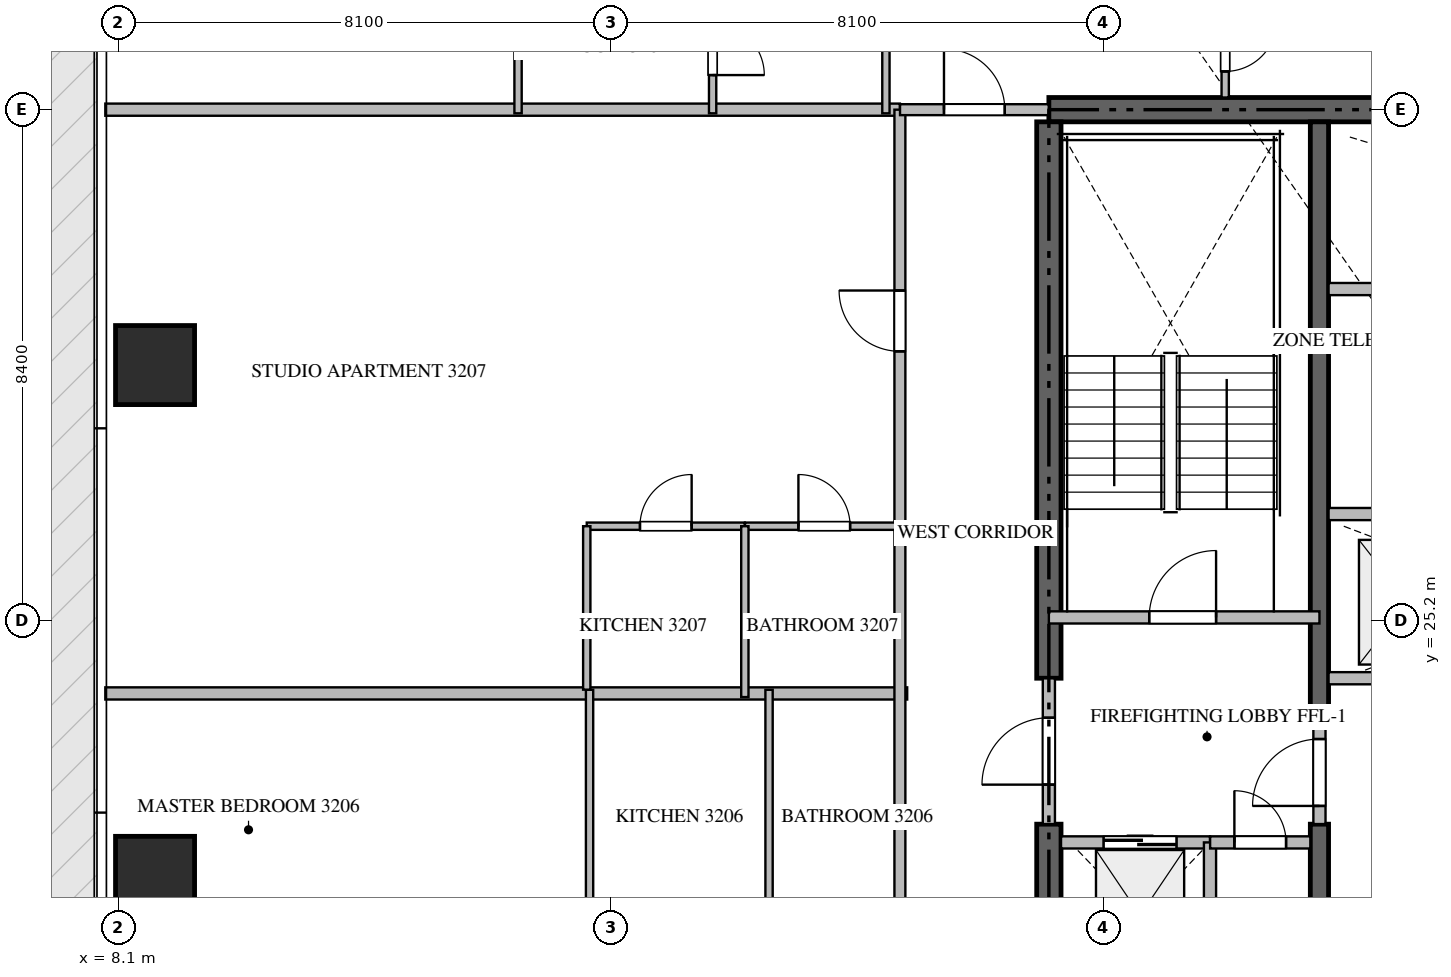
"""IFC4 building model, lengths in metres.
Left out: names, types, materials, properties, quantities, classifications, styles, units other than length and angle.
Written with IfcOpenShell. Run it as: python <this file> out.ifc"""

import sys

from ifc_helpers import new_model, si_unit, direction, frame, frame_2d, origin, origin_2d, place, context, subcontext, project, spatial, rectangle, extrude, source, transform, mapped, element, fill, save


model = new_model("IFC4")
c1 = context("Model", 3, precision=1e-05, world=origin(), true_north=direction((0.0, 1.0)))
c2 = subcontext(c1, "Body", "Model", "MODEL_VIEW")
j1 = project(units=[si_unit("LENGTHUNIT", "METRE"), si_unit("PLANEANGLEUNIT", "RADIAN")], contexts=[c1])
p1 = place(None, origin())
s1 = spatial("IfcSite", under=j1, at=p1, CompositionType="ELEMENT")
p2 = place(p1, origin())
s2 = spatial("IfcBuilding", under=s1, at=p2, CompositionType="ELEMENT")
p3 = place(p2, frame((0.0, 0.0, 131.4)))
s3 = spatial("IfcBuildingStorey", under=s2, at=p3, CompositionType="ELEMENT", Elevation=131.4)
p4 = place(p3, frame((41.4, 33.6, -0.26), z_axis=(0.0, 0.0, 1.0), x_axis=(-1.0, 0.0, 0.0)))
e1 = element("IfcWall", 1, at=p4, inside=s3, PredefinedType="SHEAR", context=c2, shape_type="SweptSolid", body=[
    extrude(rectangle(XDim=18.0, YDim=0.4, at=frame_2d((9.0, 0.0))), origin(), (0.0, 0.0, 1.0), 3.748),
])
p5 = place(p3, frame((23.4, 17.0, -0.26), z_axis=(0.0, 0.0, 1.0), x_axis=(0.0, 1.0, 0.0)))
e2 = element("IfcWall", 2, at=p5, inside=s3, PredefinedType="SHEAR", context=c2, shape_type="SweptSolid", body=[
    extrude(rectangle(XDim=4.85, YDim=0.4, at=frame_2d((2.425, 0.0))), origin(), (0.0, 0.0, 1.0), 3.748),
])
p6 = place(p3, frame((23.4, 24.25, -0.26), z_axis=(0.0, 0.0, 1.0), x_axis=(0.0, 1.0, 0.0)))
e3 = element("IfcWall", 3, at=p6, inside=s3, PredefinedType="SHEAR", context=c2, shape_type="SweptSolid", body=[
    extrude(rectangle(XDim=9.15, YDim=0.4, at=frame_2d((4.575, 0.0))), origin(), (0.0, 0.0, 1.0), 3.748),
])
p7 = place(p3, frame((27.85, 17.0, -0.26), z_axis=(0.0, 0.0, 1.0), x_axis=(0.0, 1.0, 0.0)))
e4 = element("IfcWall", 4, at=p7, inside=s3, PredefinedType="SHEAR", context=c2, shape_type="SweptSolid", body=[
    extrude(rectangle(XDim=4.85, YDim=0.3, at=frame_2d((2.425, 0.0))), origin(), (0.0, 0.0, 1.0), 3.748),
])
p8 = place(p3, frame((27.85, 23.55, -0.26), z_axis=(0.0, 0.0, 1.0), x_axis=(0.0, 1.0, 0.0)))
e5 = element("IfcWall", 5, at=p8, inside=s3, PredefinedType="SHEAR", context=c2, shape_type="SweptSolid", body=[
    extrude(rectangle(XDim=9.85, YDim=0.3, at=frame_2d((4.925, 0.0))), origin(), (0.0, 0.0, 1.0), 3.748),
])
m1 = source(origin(), c2, "Body", "SweptSolid", [
    extrude(rectangle(XDim=1.3, YDim=1.3, at=origin_2d()), origin(), (0.0, 0.0, 1.0), 3.75),
])
for number, where, z_axis, x_axis in (
    (6, (8.7, 21.0, -0.26), (0.0, 0.0, 1.0), (1.0, 0.0, 0.0)),
    (7, (8.7, 29.4, -0.26), (0.0, 0.0, 1.0), (1.0, 0.0, 0.0)),
):
    element("IfcColumn", number, at=place(p3, frame(where, z_axis=z_axis, x_axis=x_axis)), inside=s3, PredefinedType="COLUMN", context=c2, shape_type="MappedRepresentation", body=[
        mapped(m1, transform((0.0, 0.0, 0.0), scale=1.0)),
    ])
p9 = place(p3, frame((23.4, 25.25, 0.0), z_axis=(0.0, 0.0, 1.0), x_axis=(1.0, 0.0, 0.0)))
e8 = element("IfcWall", 8, at=p9, inside=s3, PredefinedType="STANDARD", context=c2, shape_type="SweptSolid", body=[
    extrude(rectangle(XDim=4.45, YDim=0.2, at=frame_2d((2.225, 0.0))), origin(), (0.0, 0.0, 1.0), 3.49),
])
p10 = place(p9, frame((1.65, 0.0, 0.0)))
e9 = element("IfcOpeningElement", 9, at=p10, cuts=e8, PredefinedType="OPENING", context=c2, shape_type="SweptSolid", body=[
    extrude(rectangle(XDim=1.1, YDim=2.15, at=frame_2d((0.55, 1.075))), frame((0.0, 0.11, 0.0), z_axis=(0.0, -1.0, 0.0), x_axis=(1.0, 0.0, 0.0)), (0.0, 0.0, 1.0), 0.22),
])
p11 = place(p3, frame((23.6, 21.55, 0.0), z_axis=(0.0, 0.0, 1.0), x_axis=(1.0, 0.0, 0.0)))
e10 = element("IfcWall", 10, at=p11, inside=s3, PredefinedType="STANDARD", context=c2, shape_type="SweptSolid", body=[
    extrude(rectangle(XDim=2.45, YDim=0.2, at=frame_2d((1.225, 0.0))), origin(), (0.0, 0.0, 1.0), 3.49),
])
p12 = place(p11, frame((0.7, 0.0, 0.0)))
e11 = element("IfcOpeningElement", 11, at=p12, cuts=e10, PredefinedType="OPENING", context=c2, shape_type="SweptSolid", body=[
    extrude(rectangle(XDim=1.2, YDim=2.2, at=frame_2d((0.6, 1.1))), frame((0.0, 0.11, 0.0), z_axis=(0.0, -1.0, 0.0), x_axis=(1.0, 0.0, 0.0)), (0.0, 0.0, 1.0), 0.22),
])
p13 = place(p3, frame((28.0, 24.25, 0.0), z_axis=(0.0, 0.0, 1.0), x_axis=(1.0, 0.0, 0.0)))
e12 = element("IfcWall", 12, at=p13, inside=s3, PredefinedType="STANDARD", context=c2, shape_type="SweptSolid", body=[
    extrude(rectangle(XDim=2.425, YDim=0.2, at=frame_2d((1.212, 0.0))), origin(), (0.0, 0.0, 1.0), 3.49),
])
p14 = place(p13, frame((0.75, 0.0, 0.0)))
e13 = element("IfcOpeningElement", 13, at=p14, cuts=e12, PredefinedType="OPENING", context=c2, shape_type="SweptSolid", body=[
    extrude(rectangle(XDim=1.1, YDim=2.2, at=frame_2d((0.55, 1.1))), frame((0.0, 0.11, 0.0), z_axis=(0.0, -1.0, 0.0), x_axis=(1.0, 0.0, 0.0)), (0.0, 0.0, 1.0), 0.22),
])
p15 = place(p3, frame((28.0, 30.65, 0.0), z_axis=(0.0, 0.0, 1.0), x_axis=(1.0, 0.0, 0.0)))
e14 = element("IfcWall", 14, at=p15, inside=s3, PredefinedType="STANDARD", context=c2, shape_type="SweptSolid", body=[
    extrude(rectangle(XDim=2.55, YDim=0.2, at=frame_2d((1.275, 0.0))), origin(), (0.0, 0.0, 1.0), 3.49),
])
p16 = place(p3, frame((26.05, 19.05, 0.0), z_axis=(0.0, 0.0, 1.0), x_axis=(0.0, 1.0, 0.0)))
e15 = element("IfcWall", 15, at=p16, inside=s3, PredefinedType="STANDARD", context=c2, shape_type="SweptSolid", body=[
    extrude(rectangle(XDim=2.5, YDim=0.2, at=frame_2d((1.25, 0.0))), origin(), (0.0, 0.0, 1.0), 3.49),
])
p17 = place(p3, frame((26.052, 21.55, 0.0), z_axis=(0.0, 0.0, 1.0), x_axis=(1.0, 0.0, 0.0)))
e16 = element("IfcWall", 16, at=p17, inside=s3, PredefinedType="STANDARD", context=c2, shape_type="SweptSolid", body=[
    extrude(rectangle(XDim=1.648, YDim=0.2, at=frame_2d((0.824, 0.0))), origin(), (0.0, 0.0, 1.0), 3.49),
])
p18 = place(p17, frame((0.399, 0.0, 0.0)))
e17 = element("IfcOpeningElement", 17, at=p18, cuts=e16, PredefinedType="OPENING", context=c2, shape_type="SweptSolid", body=[
    extrude(rectangle(XDim=0.85, YDim=2.1, at=frame_2d((0.425, 1.05))), frame((0.0, 0.11, 0.0), z_axis=(0.0, -1.0, 0.0), x_axis=(1.0, 0.0, 0.0)), (0.0, 0.0, 1.0), 0.22),
])
p19 = place(p3, frame((23.4, 21.852, 0.0), z_axis=(0.0, 0.0, 1.0), x_axis=(0.0, 1.0, 0.0)))
e18 = element("IfcWall", 18, at=p19, inside=s3, PredefinedType="STANDARD", context=c2, shape_type="SweptSolid", body=[
    extrude(rectangle(XDim=2.396, YDim=0.2, at=frame_2d((1.198, 0.0))), origin(), (0.0, 0.0, 1.0), 3.49),
])
p20 = place(p19, frame((0.648, 0.0, 0.0)))
e19 = element("IfcOpeningElement", 19, at=p20, cuts=e18, PredefinedType="OPENING", context=c2, shape_type="SweptSolid", body=[
    extrude(rectangle(XDim=1.1, YDim=2.15, at=frame_2d((0.55, 1.075))), frame((0.0, 0.11, 0.0), z_axis=(0.0, -1.0, 0.0), x_axis=(1.0, 0.0, 0.0)), (0.0, 0.0, 1.0), 0.22),
])
p21 = place(p3, frame((27.85, 21.852, 0.0), z_axis=(0.0, 0.0, 1.0), x_axis=(0.0, 1.0, 0.0)))
e20 = element("IfcWall", 20, at=p21, inside=s3, PredefinedType="STANDARD", context=c2, shape_type="SweptSolid", body=[
    extrude(rectangle(XDim=1.696, YDim=0.2, at=frame_2d((0.848, 0.0))), origin(), (0.0, 0.0, 1.0), 3.49),
])
p22 = place(p21, frame((0.298, 0.0, 0.0)))
e21 = element("IfcOpeningElement", 21, at=p22, cuts=e20, PredefinedType="OPENING", context=c2, shape_type="SweptSolid", body=[
    extrude(rectangle(XDim=1.1, YDim=2.15, at=frame_2d((0.55, 1.075))), frame((0.0, 0.11, 0.0), z_axis=(0.0, -1.0, 0.0), x_axis=(1.0, 0.0, 0.0)), (0.0, 0.0, 1.0), 0.22),
])
p23 = place(p3, frame((28.0, 26.95, 0.0), z_axis=(0.0, 0.0, 1.0), x_axis=(1.0, 0.0, 0.0)))
e22 = element("IfcWall", 22, at=p23, inside=s3, PredefinedType="STANDARD", context=c2, shape_type="SweptSolid", body=[
    extrude(rectangle(XDim=6.95, YDim=0.2, at=frame_2d((3.475, 0.0))), origin(), (0.0, 0.0, 1.0), 3.49),
])
p24 = place(p3, frame((7.882, 24.0, 0.0), z_axis=(0.0, 0.0, 1.0), x_axis=(1.0, 0.0, 0.0)))
e23 = element("IfcWall", 23, at=p24, inside=s3, PredefinedType="PARTITIONING", context=c2, shape_type="SweptSolid", body=[
    extrude(rectangle(XDim=13.188, YDim=0.2, at=frame_2d((6.594, 0.0))), origin(), (0.0, 0.0, 1.0), 3.49),
])
p25 = place(p3, frame((7.882, 33.6, 0.0), z_axis=(0.0, 0.0, 1.0), x_axis=(1.0, 0.0, 0.0)))
e24 = element("IfcWall", 24, at=p25, inside=s3, PredefinedType="PARTITIONING", context=c2, shape_type="SweptSolid", body=[
    extrude(rectangle(XDim=13.068, YDim=0.2, at=frame_2d((6.534, 0.0))), origin(), (0.0, 0.0, 1.0), 3.49),
])
p26 = place(p3, frame((20.95, 14.9, 0.0), z_axis=(0.0, 0.0, 1.0), x_axis=(0.0, 1.0, 0.0)))
e25 = element("IfcWall", 25, at=p26, inside=s3, PredefinedType="PARTITIONING", context=c2, shape_type="SweptSolid", body=[
    extrude(rectangle(XDim=18.7, YDim=0.18, at=frame_2d((9.35, 0.0))), origin(), (0.0, 0.0, 1.0), 3.49),
])
p27 = place(p26, frame((1.805, 0.0, 0.0)))
e26 = element("IfcOpeningElement", 26, at=p27, cuts=e25, PredefinedType="OPENING", context=c2, shape_type="SweptSolid", body=[
    extrude(rectangle(XDim=1.0, YDim=2.15, at=frame_2d((0.5, 1.075))), frame((0.0, 0.1, 0.0), z_axis=(0.0, -1.0, 0.0), x_axis=(1.0, 0.0, 0.0)), (0.0, 0.0, 1.0), 0.2),
])
p28 = place(p26, frame((14.726, 0.0, 0.0)))
e27 = element("IfcOpeningElement", 27, at=p28, cuts=e25, PredefinedType="OPENING", context=c2, shape_type="SweptSolid", body=[
    extrude(rectangle(XDim=1.0, YDim=2.15, at=frame_2d((0.5, 1.075))), frame((0.0, 0.1, 0.0), z_axis=(0.0, -1.0, 0.0), x_axis=(1.0, 0.0, 0.0)), (0.0, 0.0, 1.0), 0.2),
])
p29 = place(p3, frame((20.952, 33.6, 0.0), z_axis=(0.0, 0.0, 1.0), x_axis=(1.0, 0.0, 0.0)))
e28 = element("IfcWall", 28, at=p29, inside=s3, PredefinedType="PARTITIONING", context=c2, shape_type="SweptSolid", body=[
    extrude(rectangle(XDim=2.446, YDim=0.18, at=frame_2d((1.223, 0.0))), origin(), (0.0, 0.0, 1.0), 3.49),
])
p30 = place(p29, frame((0.723, 0.0, 0.0)))
e29 = element("IfcOpeningElement", 29, at=p30, cuts=e28, PredefinedType="OPENING", context=c2, shape_type="SweptSolid", body=[
    extrude(rectangle(XDim=1.0, YDim=2.15, at=frame_2d((0.5, 1.075))), frame((0.0, 0.1, 0.0), z_axis=(0.0, -1.0, 0.0), x_axis=(1.0, 0.0, 0.0)), (0.0, 0.0, 1.0), 0.2),
])
p31 = place(p3, frame((20.72, 36.35, 0.0), z_axis=(0.0, 0.0, 1.0), x_axis=(0.0, -1.0, 0.0)))
e30 = element("IfcWall", 30, at=p31, inside=s3, PredefinedType="PARTITIONING", context=c2, shape_type="SweptSolid", body=[
    extrude(rectangle(XDim=2.81, YDim=0.12, at=frame_2d((1.405, 0.0))), origin(), (0.0, 0.0, 1.0), 3.49),
])
p32 = place(p3, frame((14.67, 35.65, 0.0), z_axis=(0.0, 0.0, 1.0), x_axis=(0.0, -1.0, 0.0)))
e31 = element("IfcWall", 31, at=p32, inside=s3, PredefinedType="PARTITIONING", context=c2, shape_type="SweptSolid", body=[
    extrude(rectangle(XDim=2.11, YDim=0.12, at=frame_2d((1.055, 0.0))), origin(), (0.0, 0.0, 1.0), 3.49),
])
p33 = place(p3, frame((17.87, 35.648, 0.0), z_axis=(0.0, 0.0, 1.0), x_axis=(0.0, -1.0, 0.0)))
e32 = element("IfcWall", 32, at=p33, inside=s3, PredefinedType="PARTITIONING", context=c2, shape_type="SweptSolid", body=[
    extrude(rectangle(XDim=2.108, YDim=0.12, at=frame_2d((1.054, 0.0))), origin(), (0.0, 0.0, 1.0), 3.49),
])
p34 = place(p33, frame((0.629, 0.0, 0.0)))
e33 = element("IfcOpeningElement", 33, at=p34, cuts=e32, PredefinedType="OPENING", context=c2, shape_type="SweptSolid", body=[
    extrude(rectangle(XDim=0.85, YDim=2.1, at=frame_2d((0.425, 1.05))), frame((0.0, 0.07, 0.0), z_axis=(0.0, -1.0, 0.0), x_axis=(1.0, 0.0, 0.0)), (0.0, 0.0, 1.0), 0.14),
])
p35 = place(p3, frame((26.3, 35.648, 0.0), z_axis=(0.0, 0.0, 1.0), x_axis=(0.0, -1.0, 0.0)))
e34 = element("IfcWall", 34, at=p35, inside=s3, PredefinedType="PARTITIONING", context=c2, shape_type="SweptSolid", body=[
    extrude(rectangle(XDim=1.848, YDim=0.12, at=frame_2d((0.924, 0.0))), origin(), (0.0, 0.0, 1.0), 3.49),
])
p36 = place(p35, frame((0.569, 0.0, 0.0)))
e35 = element("IfcOpeningElement", 35, at=p36, cuts=e34, PredefinedType="OPENING", context=c2, shape_type="SweptSolid", body=[
    extrude(rectangle(XDim=0.85, YDim=2.1, at=frame_2d((0.425, 1.05))), frame((0.0, 0.07, 0.0), z_axis=(0.0, -1.0, 0.0), x_axis=(1.0, 0.0, 0.0)), (0.0, 0.0, 1.0), 0.14),
])
for number, where, z_axis, x_axis in (
    (36, (15.846, 19.4, 0.0), (0.0, 0.0, 1.0), (0.0, 1.0, 0.0)),
    (37, (18.798, 19.4, 0.0), (0.0, 0.0, 1.0), (0.0, 1.0, 0.0)),
):
    element("IfcWall", number, at=place(p3, frame(where, z_axis=z_axis, x_axis=x_axis)), inside=s3, PredefinedType="PARTITIONING", context=c2, shape_type="SweptSolid", body=[
        extrude(rectangle(XDim=4.66, YDim=0.12, at=frame_2d((2.33, 0.0))), origin(), (0.0, 0.0, 1.0), 3.49),
    ])
p37 = place(p3, frame((15.8, 26.75, 0.0), z_axis=(0.0, 0.0, 1.0), x_axis=(1.0, 0.0, 0.0)))
e38 = element("IfcWall", 38, at=p37, inside=s3, PredefinedType="PARTITIONING", context=c2, shape_type="SweptSolid", body=[
    extrude(rectangle(XDim=2.6, YDim=0.12, at=frame_2d((1.3, 0.0))), origin(), (0.0, 0.0, 1.0), 3.49),
])
p38 = place(p37, frame((0.875, 0.0, 0.0)))
e39 = element("IfcOpeningElement", 39, at=p38, cuts=e38, PredefinedType="OPENING", context=c2, shape_type="SweptSolid", body=[
    extrude(rectangle(XDim=0.85, YDim=2.1, at=frame_2d((0.425, 1.05))), frame((0.0, 0.07, 0.0), z_axis=(0.0, -1.0, 0.0), x_axis=(1.0, 0.0, 0.0)), (0.0, 0.0, 1.0), 0.14),
])
p39 = place(p3, frame((18.402, 26.75, 0.0), z_axis=(0.0, 0.0, 1.0), x_axis=(1.0, 0.0, 0.0)))
e40 = element("IfcWall", 40, at=p39, inside=s3, PredefinedType="PARTITIONING", context=c2, shape_type="SweptSolid", body=[
    extrude(rectangle(XDim=2.608, YDim=0.12, at=frame_2d((1.304, 0.0))), origin(), (0.0, 0.0, 1.0), 3.49),
])
p40 = place(p39, frame((0.879, 0.0, 0.0)))
e41 = element("IfcOpeningElement", 41, at=p40, cuts=e40, PredefinedType="OPENING", context=c2, shape_type="SweptSolid", body=[
    extrude(rectangle(XDim=0.85, YDim=2.1, at=frame_2d((0.425, 1.05))), frame((0.0, 0.07, 0.0), z_axis=(0.0, -1.0, 0.0), x_axis=(1.0, 0.0, 0.0)), (0.0, 0.0, 1.0), 0.14),
])
p41 = place(p3, frame((18.4, 23.94, 0.0), z_axis=(0.0, 0.0, 1.0), x_axis=(0.0, 1.0, 0.0)))
e42 = element("IfcWall", 42, at=p41, inside=s3, PredefinedType="PARTITIONING", context=c2, shape_type="SweptSolid", body=[
    extrude(rectangle(XDim=2.81, YDim=0.12, at=frame_2d((1.405, 0.0))), origin(), (0.0, 0.0, 1.0), 3.49),
])
p42 = place(p3, frame((15.8, 24.062, 0.0), z_axis=(0.0, 0.0, 1.0), x_axis=(0.0, 1.0, 0.0)))
e43 = element("IfcWall", 43, at=p42, inside=s3, PredefinedType="PARTITIONING", context=c2, shape_type="SweptSolid", body=[
    extrude(rectangle(XDim=2.688, YDim=0.12, at=frame_2d((1.344, 0.0))), origin(), (0.0, 0.0, 1.0), 3.49),
])
m2 = source(origin(), c2, "Body", "SweptSolid", [
    extrude(rectangle(XDim=1.1, YDim=2.15, at=frame_2d((0.55, 1.075))), frame((0.0, 0.025, 0.0), z_axis=(0.0, -1.0, 0.0), x_axis=(1.0, 0.0, 0.0)), (0.0, 0.0, 1.0), 0.05),
])
p43 = place(p10, origin())
e44 = element("IfcDoor", 44, at=p43, inside=s3, OperationType="SINGLE_SWING_RIGHT", PredefinedType="DOOR", context=c2, shape_type="MappedRepresentation", body=[
    mapped(m2, transform((0.0, 0.0, 0.0), scale=1.0)),
])
fill(e9, e44)
m3 = source(origin(), c2, "Body", "SweptSolid", [
    extrude(rectangle(XDim=1.2, YDim=2.2, at=frame_2d((0.6, 1.1))), frame((0.0, 0.025, 0.0), z_axis=(0.0, -1.0, 0.0), x_axis=(1.0, 0.0, 0.0)), (0.0, 0.0, 1.0), 0.05),
])
p44 = place(p12, origin())
e45 = element("IfcDoor", 45, at=p44, inside=s3, OperationType="DOUBLE_DOOR_SLIDING", PredefinedType="DOOR", context=c2, shape_type="MappedRepresentation", body=[
    mapped(m3, transform((0.0, 0.0, 0.0), scale=1.0)),
])
fill(e11, e45)
m4 = source(origin(), c2, "Body", "SweptSolid", [
    extrude(rectangle(XDim=0.85, YDim=2.1, at=frame_2d((0.425, 1.05))), frame((0.0, 0.025, 0.0), z_axis=(0.0, -1.0, 0.0), x_axis=(1.0, 0.0, 0.0)), (0.0, 0.0, 1.0), 0.05),
])
p45 = place(p18, origin())
e46 = element("IfcDoor", 46, at=p45, inside=s3, OperationType="SINGLE_SWING_LEFT", PredefinedType="DOOR", context=c2, shape_type="MappedRepresentation", body=[
    mapped(m4, transform((0.0, 0.0, 0.0), scale=1.0)),
])
fill(e17, e46)
p46 = place(p20, origin())
e47 = element("IfcDoor", 47, at=p46, inside=s3, OperationType="SINGLE_SWING_LEFT", PredefinedType="DOOR", context=c2, shape_type="MappedRepresentation", body=[
    mapped(m2, transform((0.0, 0.0, 0.0), scale=1.0)),
])
fill(e19, e47)
p47 = place(p22, origin())
e48 = element("IfcDoor", 48, at=p47, inside=s3, OperationType="SINGLE_SWING_LEFT", PredefinedType="DOOR", context=c2, shape_type="MappedRepresentation", body=[
    mapped(m2, transform((0.0, 0.0, 0.0), scale=1.0)),
])
fill(e21, e48)
m5 = source(origin(), c2, "Body", "SweptSolid", [
    extrude(rectangle(XDim=1.0, YDim=2.15, at=frame_2d((0.5, 1.075))), frame((0.0, 0.025, 0.0), z_axis=(0.0, -1.0, 0.0), x_axis=(1.0, 0.0, 0.0)), (0.0, 0.0, 1.0), 0.05),
])
p48 = place(p28, origin())
e49 = element("IfcDoor", 49, at=p48, inside=s3, OperationType="SINGLE_SWING_RIGHT", PredefinedType="DOOR", context=c2, shape_type="MappedRepresentation", body=[
    mapped(m5, transform((0.0, 0.0, 0.0), scale=1.0)),
])
fill(e27, e49)
p49 = place(p30, origin())
e50 = element("IfcDoor", 50, at=p49, inside=s3, OperationType="SINGLE_SWING_LEFT", PredefinedType="DOOR", context=c2, shape_type="MappedRepresentation", body=[
    mapped(m5, transform((0.0, 0.0, 0.0), scale=1.0)),
])
fill(e29, e50)
p50 = place(p34, origin())
e51 = element("IfcDoor", 51, at=p50, inside=s3, OperationType="SINGLE_SWING_RIGHT", PredefinedType="DOOR", context=c2, shape_type="MappedRepresentation", body=[
    mapped(m4, transform((0.0, 0.0, 0.0), scale=1.0)),
])
fill(e33, e51)
p51 = place(p36, origin())
e52 = element("IfcDoor", 52, at=p51, inside=s3, OperationType="SINGLE_SWING_LEFT", PredefinedType="DOOR", context=c2, shape_type="MappedRepresentation", body=[
    mapped(m4, transform((0.0, 0.0, 0.0), scale=1.0)),
])
fill(e35, e52)
p52 = place(p38, origin())
e53 = element("IfcDoor", 53, at=p52, inside=s3, OperationType="SINGLE_SWING_RIGHT", PredefinedType="DOOR", context=c2, shape_type="MappedRepresentation", body=[
    mapped(m4, transform((0.0, 0.0, 0.0), scale=1.0)),
])
fill(e39, e53)
p53 = place(p40, origin())
e54 = element("IfcDoor", 54, at=p53, inside=s3, OperationType="SINGLE_SWING_LEFT", PredefinedType="DOOR", context=c2, shape_type="MappedRepresentation", body=[
    mapped(m4, transform((0.0, 0.0, 0.0), scale=1.0)),
])
fill(e41, e54)
save(model, sys.argv[1])
